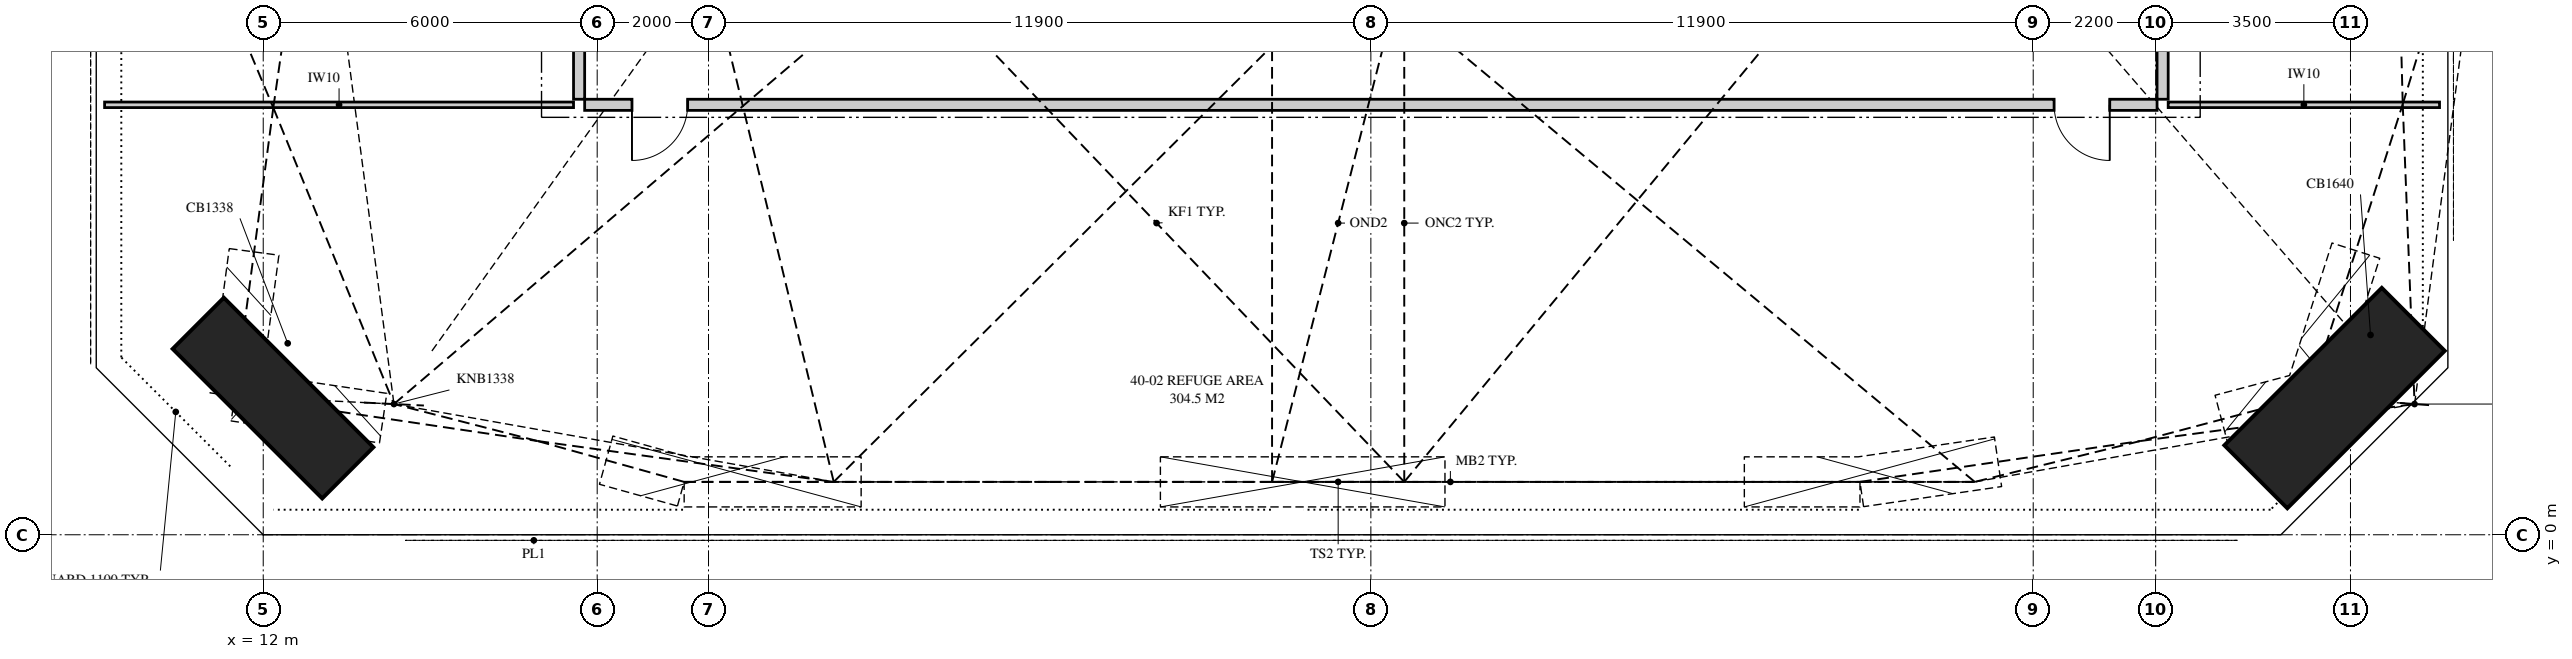
"""IFC4 building model, lengths in metres.
Left out: names, types, materials, properties, quantities, classifications, styles, units other than length and angle.
Written with IfcOpenShell. Run it as: python <this file> out.ifc"""

import sys

from ifc_helpers import new_model, si_unit, direction, frame, frame_2d, origin, origin_2d, place, context, subcontext, project, spatial, polyline, rectangle, hollow_rectangle, outline, extrude, element, fill, save


model = new_model("IFC4")
c1 = context("Model", 3, precision=1e-05, world=origin(), true_north=direction((0.0, 1.0)))
c2 = subcontext(c1, "Body", "Model", "MODEL_VIEW")
j1 = project(units=[si_unit("LENGTHUNIT", "METRE"), si_unit("PLANEANGLEUNIT", "RADIAN")], contexts=[c1])
p1 = place(None, origin())
s1 = spatial("IfcSite", under=j1, at=p1, CompositionType="ELEMENT")
p2 = place(p1, origin())
s2 = spatial("IfcBuilding", under=s1, at=p2, CompositionType="ELEMENT")
p3 = place(p2, frame((0.0, 0.0, 149.35)))
s3 = spatial("IfcBuildingStorey", under=s2, at=p3, CompositionType="ELEMENT", Elevation=149.35)
p4 = place(p3, frame((11.49, 2.49, 0.0), z_axis=(0.496153336889, -0.024578829467, 0.867886943925), x_axis=(0.57458296644, 0.758690253197, -0.306991065636)))
e1 = element("IfcColumn", 1, at=p4, inside=s3, PredefinedType="COLUMN", context=c2, shape_type="SweptSolid", body=[
    extrude(hollow_rectangle(XDim=1.3, YDim=3.8, WallThickness=0.125, at=origin_2d()), origin(), (0.0, 0.0, 1.0), 4.676),
])
p5 = place(p3, frame((48.76, 2.49, 0.0), z_axis=(0.353720522453, -0.026478820731, 0.934976290634), x_axis=(-0.635348857668, 0.726799609686, 0.260948570451)))
e2 = element("IfcColumn", 2, at=p5, inside=s3, PredefinedType="COLUMN", context=c2, shape_type="SweptSolid", body=[
    extrude(hollow_rectangle(XDim=1.6, YDim=4.0, WallThickness=0.125, at=origin_2d()), origin(), (0.0, 0.0, 1.0), 4.611),
])
p6 = place(p3, frame((17.775, 7.725, 0.0), z_axis=(0.0, 0.0, 1.0), x_axis=(1.0, 0.0, 0.0)))
e3 = element("IfcWall", 3, at=p6, inside=s3, PredefinedType="PARTITIONING", context=c2, shape_type="SweptSolid", body=[
    extrude(outline(polyline([(0.0, 0.0), (28.25, 0.0), (28.25, 2.52), (27.466, 2.52), (27.466, 4.72), (20.724, 4.72), (20.724, 4.141), (19.945, 4.141), (19.945, 4.72), (17.341, 4.72), (17.341, 4.141), (16.364, 4.141), (16.364, 4.72), (15.01, 4.72), (15.01, 4.208), (14.44, 4.208), (14.44, 4.72), (11.722, 4.72), (11.722, 4.141), (10.851, 4.141), (10.851, 4.72), (8.664, 4.72), (8.664, 4.141), (7.819, 4.141), (7.819, 4.72), (3.349, 4.72), (3.349, 4.141), (2.388, 4.141), (2.388, 4.72), (1.105, 4.72), (1.105, 2.52), (0.0, 2.52), (0.0, 0.0)]), holes=[polyline([(13.78, 3.239), (13.834, 3.353), (14.381, 3.423), (14.381, 2.917), (14.326, 2.803), (13.78, 2.732), (13.78, 3.239)])]), frame((0.0, 0.1, 0.0), z_axis=(0.0, -1.0, 0.0), x_axis=(1.0, 0.0, 0.0)), (0.0, 0.0, 1.0), 0.2),
])
p7 = place(p6, frame((0.85, 0.0, 0.0)))
e4 = element("IfcOpeningElement", 4, at=p7, cuts=e3, PredefinedType="OPENING", context=c2, shape_type="SweptSolid", body=[
    extrude(rectangle(XDim=1.0, YDim=2.1, at=frame_2d((0.5, 1.05))), frame((0.0, 0.11, 0.0), z_axis=(0.0, -1.0, 0.0), x_axis=(1.0, 0.0, 0.0)), (0.0, 0.0, 1.0), 0.22),
])
p8 = place(p6, frame((26.4, 0.0, 0.0)))
e5 = element("IfcOpeningElement", 5, at=p8, cuts=e3, PredefinedType="OPENING", context=c2, shape_type="SweptSolid", body=[
    extrude(rectangle(XDim=1.0, YDim=2.1, at=frame_2d((0.5, 1.05))), frame((0.0, 0.11, 0.0), z_axis=(0.0, -1.0, 0.0), x_axis=(1.0, 0.0, 0.0)), (0.0, 0.0, 1.0), 0.22),
])
p9 = place(p3, frame((17.675, 7.825, 0.0), z_axis=(0.0, 0.0, 1.0), x_axis=(0.0, 1.0, 0.0)))
e6 = element("IfcWall", 6, at=p9, inside=s3, PredefinedType="PARTITIONING", context=c2, shape_type="SweptSolid", body=[
    extrude(outline(polyline([(0.0, 0.0), (1.55, 0.0), (1.55, 4.72), (0.174, 4.72), (0.174, 2.52), (0.0, 2.52), (0.0, 0.0)])), frame((0.0, 0.1, 0.0), z_axis=(0.0, -1.0, 0.0), x_axis=(1.0, 0.0, 0.0)), (0.0, 0.0, 1.0), 0.2),
])
p10 = place(p3, frame((46.125, 7.825, 0.0), z_axis=(0.0, 0.0, 1.0), x_axis=(0.0, 1.0, 0.0)))
e7 = element("IfcWall", 7, at=p10, inside=s3, PredefinedType="PARTITIONING", context=c2, shape_type="SweptSolid", body=[
    extrude(outline(polyline([(0.0, 0.0), (1.55, 0.0), (1.55, 4.72), (0.622, 4.72), (0.622, 2.52), (0.0, 2.52), (0.0, 0.0)])), frame((0.0, 0.1, 0.0), z_axis=(0.0, -1.0, 0.0), x_axis=(1.0, 0.0, 0.0)), (0.0, 0.0, 1.0), 0.2),
])
p11 = place(p3, frame((9.15, 7.725, 0.0), z_axis=(0.0, 0.0, 1.0), x_axis=(1.0, 0.0, 0.0)))
e8 = element("IfcWall", 8, at=p11, inside=s3, PredefinedType="PARTITIONING", context=c2, shape_type="SweptSolid", body=[
    extrude(outline(polyline([(3.625, 4.72), (0.0, 4.72), (0.0, 0.0), (8.425, 0.0), (8.425, 2.52), (8.394, 2.52), (8.394, 4.72), (5.36, 4.72), (5.36, 3.5), (3.625, 3.5), (3.625, 4.72)]), holes=[polyline([(3.472, 1.365), (3.472, 1.365), (3.47, 1.363), (3.467, 1.358), (3.466, 1.358), (3.452, 1.342), (3.442, 1.309), (3.358, 1.303), (2.545, 1.168), (2.545, 2.055), (2.59, 2.105), (2.587, 2.108), (2.617, 2.113), (2.617, 2.152), (2.634, 2.207), (3.46, 2.262), (3.46, 2.252), (3.472, 2.254), (3.472, 1.365)])]), frame((0.0, 0.05, 0.0), z_axis=(0.0, -1.0, 0.0), x_axis=(1.0, 0.0, 0.0)), (0.0, 0.0, 1.0), 0.1),
])
p12 = place(p3, frame((46.225, 7.725, 0.0), z_axis=(0.0, 0.0, 1.0), x_axis=(1.0, 0.0, 0.0)))
e9 = element("IfcWall", 9, at=p12, inside=s3, PredefinedType="PARTITIONING", context=c2, shape_type="SweptSolid", body=[
    extrude(outline(polyline([(0.469, 2.52), (0.0, 2.52), (0.0, 0.0), (4.875, 0.0), (4.875, 3.5), (4.265, 3.5), (4.265, 4.72), (0.469, 4.72), (0.469, 2.52)]), holes=[polyline([(4.654, 2.261), (4.654, 1.38), (4.656, 1.369), (4.654, 1.366), (4.654, 1.362), (4.652, 1.363), (4.625, 1.324), (4.623, 1.271), (4.256, 1.266), (3.764, 1.198), (3.764, 2.09), (3.778, 2.11), (3.778, 2.11), (3.801, 2.147), (3.802, 2.147), (3.802, 2.152), (3.807, 2.208), (4.333, 2.218), (4.654, 2.261)])]), frame((0.0, 0.05, 0.0), z_axis=(0.0, -1.0, 0.0), x_axis=(1.0, 0.0, 0.0)), (0.0, 0.0, 1.0), 0.1),
])
p13 = place(p7, frame((1.0, 0.0, 0.0), z_axis=(0.0, 0.0, 1.0), x_axis=(-1.0, 0.0, 0.0)))
e10 = element("IfcDoor", 10, at=p13, inside=s3, OperationType="SINGLE_SWING_RIGHT", PredefinedType="DOOR", context=c2, shape_type="SweptSolid", body=[
    extrude(rectangle(XDim=1.0, YDim=2.1, at=frame_2d((0.5, 1.05))), frame((0.0, 0.025, 0.0), z_axis=(0.0, -1.0, 0.0), x_axis=(1.0, 0.0, 0.0)), (0.0, 0.0, 1.0), 0.05),
])
fill(e4, e10)
p14 = place(p8, frame((1.0, 0.0, 0.0), z_axis=(0.0, 0.0, 1.0), x_axis=(-1.0, 0.0, 0.0)))
e11 = element("IfcDoor", 11, at=p14, inside=s3, OperationType="SINGLE_SWING_LEFT", PredefinedType="DOOR", context=c2, shape_type="SweptSolid", body=[
    extrude(rectangle(XDim=1.0, YDim=2.1, at=frame_2d((0.5, 1.05))), frame((0.0, 0.025, 0.0), z_axis=(0.0, -1.0, 0.0), x_axis=(1.0, 0.0, 0.0)), (0.0, 0.0, 1.0), 0.05),
])
fill(e5, e11)
save(model, sys.argv[1])
